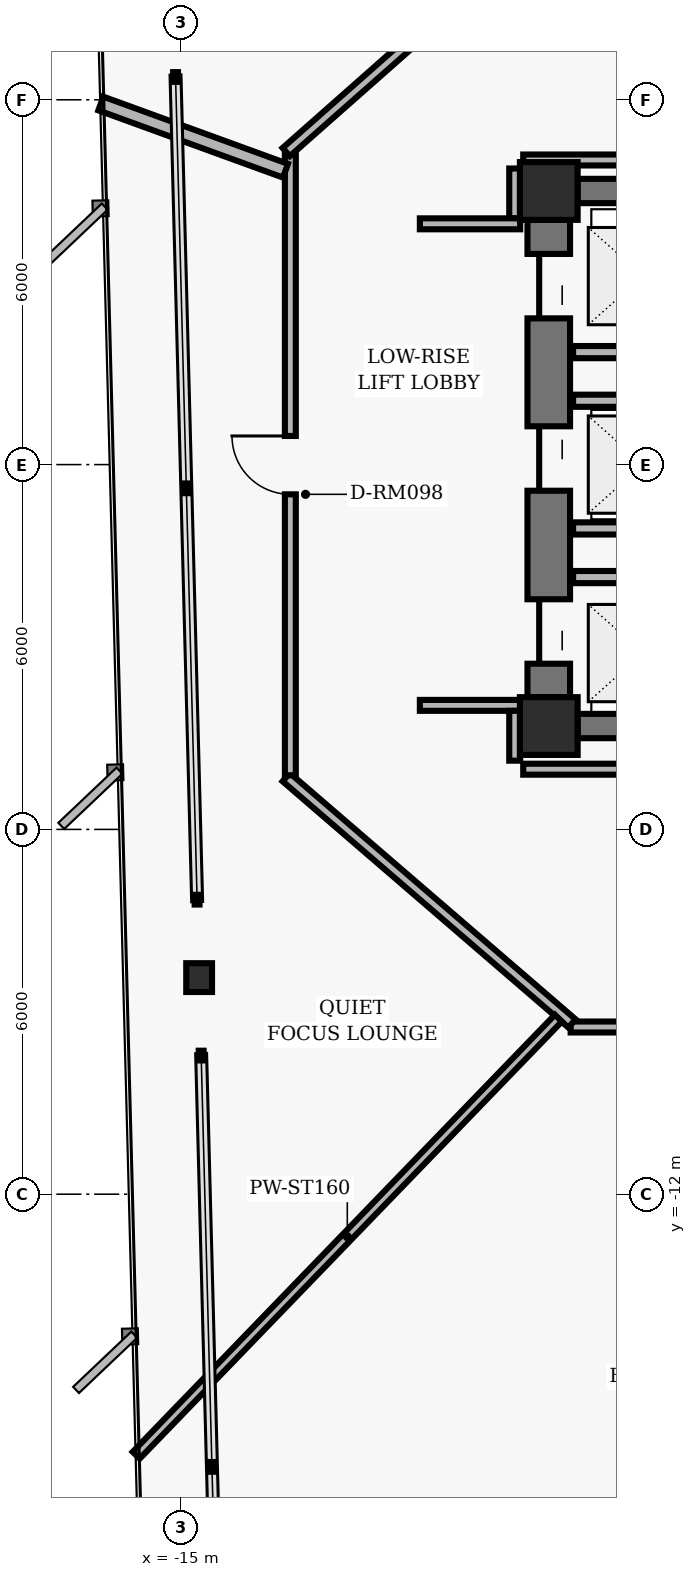
"""IFC4 building model, lengths in metres.
Left out: names, types, materials, properties, quantities, classifications, styles, units other than length and angle.
Written with IfcOpenShell. Run it as: python <this file> out.ifc"""

import sys

from ifc_helpers import new_model, si_unit, direction, frame, frame_2d, origin, origin_2d, place, context, subcontext, project, spatial, rectangle, hollow_rectangle, i_section, extrude, element, fill, save


model = new_model("IFC4")
c1 = context("Model", 3, precision=1e-05, world=origin(), true_north=direction((0.0, 1.0)))
c2 = subcontext(c1, "Body", "Model", "MODEL_VIEW")
j1 = project(units=[si_unit("LENGTHUNIT", "METRE"), si_unit("PLANEANGLEUNIT", "RADIAN")], contexts=[c1])
p1 = place(None, origin())
s1 = spatial("IfcSite", under=j1, at=p1, CompositionType="ELEMENT")
p2 = place(p1, origin())
s2 = spatial("IfcBuilding", under=s1, at=p2, CompositionType="ELEMENT")
p3 = place(p2, frame((0.0, 0.0, 39.04)))
s3 = spatial("IfcBuildingStorey", under=s2, at=p3, CompositionType="ELEMENT", Elevation=39.04)
for number, where, z_axis, x_axis in (
    (1, (-8.95, 4.5, 0.0), (0.0, 0.0, 1.0), (1.0, 0.0, 0.0)),
    (2, (-8.95, -4.3, 0.0), (0.0, 0.0, 1.0), (1.0, 0.0, 0.0)),
):
    element("IfcColumn", number, at=place(p3, frame(where, z_axis=z_axis, x_axis=x_axis)), inside=s3, PredefinedType="COLUMN", context=c2, shape_type="SweptSolid", body=[
        extrude(hollow_rectangle(XDim=0.95, YDim=0.95, WallThickness=0.06, InnerFilletRadius=0.02, OuterFilletRadius=0.04, at=origin_2d()), origin(), (0.0, 0.0, 1.0), 3.36),
    ])
p4 = place(p3, frame((-8.95, -3.825, 0.0), z_axis=(0.0, 0.0, 1.0), x_axis=(0.0, 1.0, 0.0)))
e3 = element("IfcWall", 3, at=p4, inside=s3, PredefinedType="SHEAR", context=c2, shape_type="SweptSolid", body=[
    extrude(rectangle(XDim=7.85, YDim=0.7, at=frame_2d((3.925, 0.0))), origin(), (0.0, 0.0, 1.0), 3.098),
])
p5 = place(p4, frame((0.55, 0.0, 0.0)))
e4 = element("IfcOpeningElement", 4, at=p5, cuts=e3, PredefinedType="OPENING", context=c2, shape_type="SweptSolid", body=[
    extrude(rectangle(XDim=1.06, YDim=2.04, at=frame_2d((0.53, 1.02))), frame((0.0, 0.36, 0.0), z_axis=(0.0, -1.0, 0.0), x_axis=(1.0, 0.0, 0.0)), (0.0, 0.0, 1.0), 0.72),
])
p6 = place(p4, frame((3.395, 0.0, 0.0)))
e5 = element("IfcOpeningElement", 5, at=p6, cuts=e3, PredefinedType="OPENING", context=c2, shape_type="SweptSolid", body=[
    extrude(rectangle(XDim=1.06, YDim=2.04, at=frame_2d((0.53, 1.02))), frame((0.0, 0.36, 0.0), z_axis=(0.0, -1.0, 0.0), x_axis=(1.0, 0.0, 0.0)), (0.0, 0.0, 1.0), 0.72),
])
p7 = place(p4, frame((6.23, 0.0, 0.0)))
e6 = element("IfcOpeningElement", 6, at=p7, cuts=e3, PredefinedType="OPENING", context=c2, shape_type="SweptSolid", body=[
    extrude(rectangle(XDim=1.06, YDim=2.04, at=frame_2d((0.53, 1.02))), frame((0.0, 0.36, 0.0), z_axis=(0.0, -1.0, 0.0), x_axis=(1.0, 0.0, 0.0)), (0.0, 0.0, 1.0), 0.72),
])
for number, where, z_axis, x_axis in (
    (7, (-8.475, 4.5, 0.0), (0.0, 0.0, 1.0), (1.0, 0.0, 0.0)),
    (8, (-8.475, -4.3, 0.0), (0.0, 0.0, 1.0), (1.0, 0.0, 0.0)),
):
    element("IfcWall", number, at=place(p3, frame(where, z_axis=z_axis, x_axis=x_axis)), inside=s3, PredefinedType="SHEAR", context=c2, shape_type="SweptSolid", body=[
        extrude(rectangle(XDim=1.95, YDim=0.4, at=frame_2d((0.975, 0.0))), origin(), (0.0, 0.0, 1.0), 3.098),
    ])
p8 = place(p3, frame((-14.7, -8.438, 0.0), z_axis=(0.0, 0.0, 1.0), x_axis=(1.0, 0.0, 0.0)))
e9 = element("IfcColumn", 9, at=p8, inside=s3, PredefinedType="COLUMN", context=c2, shape_type="SweptSolid", body=[
    extrude(i_section(OverallWidth=0.424, OverallDepth=0.474, WebThickness=0.048, FlangeThickness=0.077, FilletRadius=0.025, at=origin_2d()), origin(), (0.0, 0.0, 1.0), 3.36),
])
for number, where, z_axis, x_axis in (
    (10, (-8.55, -1.85, 0.0), (0.0, 0.0, 1.0), (1.0, 0.0, 0.0)),
    (11, (-8.55, 1.85, 0.0), (0.0, 0.0, 1.0), (1.0, 0.0, 0.0)),
):
    element("IfcWall", number, at=place(p3, frame(where, z_axis=z_axis, x_axis=x_axis)), inside=s3, PredefinedType="PARTITIONING", context=c2, shape_type="SweptSolid", body=[
        extrude(rectangle(XDim=2.1, YDim=0.2, at=frame_2d((1.05, 0.0))), origin(), (0.0, 0.0, 1.0), 3.073),
    ])
for number, where, z_axis, x_axis in (
    (12, (-8.55, -1.05, 0.0), (0.0, 0.0, 1.0), (1.0, 0.0, 0.0)),
    (13, (-8.55, 1.05, 0.0), (0.0, 0.0, 1.0), (1.0, 0.0, 0.0)),
):
    element("IfcWall", number, at=place(p3, frame(where, z_axis=z_axis, x_axis=x_axis)), inside=s3, PredefinedType="PARTITIONING", context=c2, shape_type="SweptSolid", body=[
        extrude(rectangle(XDim=1.91, YDim=0.2, at=frame_2d((0.955, 0.0))), origin(), (0.0, 0.0, 1.0), 3.073),
    ])
p9 = place(p3, frame((8.41, -9.25, 0.0), z_axis=(0.0, 0.0, 1.0), x_axis=(-1.0, 0.0, 0.0)))
e14 = element("IfcWall", 14, at=p9, inside=s3, PredefinedType="PARTITIONING", context=c2, shape_type="SweptSolid", body=[
    extrude(rectangle(XDim=17.0, YDim=0.18, at=frame_2d((8.5, 0.0))), origin(), (0.0, 0.0, 1.0), 2.587),
])
p10 = place(p9, frame((9.399, 0.0, 0.0)))
e15 = element("IfcOpeningElement", 15, at=p10, cuts=e14, PredefinedType="OPENING", context=c2, shape_type="SweptSolid", body=[
    extrude(rectangle(XDim=0.96, YDim=2.02, at=frame_2d((0.48, 1.01))), frame((0.0, 0.1, 0.0), z_axis=(0.0, -1.0, 0.0), x_axis=(1.0, 0.0, 0.0)), (0.0, 0.0, 1.0), 0.2),
])
p11 = place(p3, frame((-8.568, -9.191, 0.0), z_axis=(0.0, 0.0, 1.0), x_axis=(-0.757556899173, 0.652769135694, 0.0)))
e16 = element("IfcWall", 16, at=p11, inside=s3, PredefinedType="PARTITIONING", context=c2, shape_type="SweptSolid", body=[
    extrude(rectangle(XDim=6.204, YDim=0.18, at=frame_2d((3.102, 0.0))), origin(), (0.0, 0.0, 1.0), 3.073),
])
p12 = place(p3, frame((-13.2, -5.11, 0.0), z_axis=(0.0, 0.0, 1.0), x_axis=(0.0, 1.0, 0.0)))
e17 = element("IfcWall", 17, at=p12, inside=s3, PredefinedType="PARTITIONING", context=c2, shape_type="SweptSolid", body=[
    extrude(rectangle(XDim=10.22, YDim=0.18, at=frame_2d((5.11, 0.0))), origin(), (0.0, 0.0, 1.0), 2.587),
])
p13 = place(p12, frame((4.621, 0.0, 0.0)))
e18 = element("IfcOpeningElement", 18, at=p13, cuts=e17, PredefinedType="OPENING", context=c2, shape_type="SweptSolid", body=[
    extrude(rectangle(XDim=0.96, YDim=2.02, at=frame_2d((0.48, 1.01))), frame((0.0, 0.1, 0.0), z_axis=(0.0, -1.0, 0.0), x_axis=(1.0, 0.0, 0.0)), (0.0, 0.0, 1.0), 0.2),
])
p14 = place(p3, frame((-13.268, 5.14, 0.0), z_axis=(0.0, 0.0, 1.0), x_axis=(0.749626463267, 0.66186113768, 0.0)))
e19 = element("IfcWall", 19, at=p14, inside=s3, PredefinedType="PARTITIONING", context=c2, shape_type="SweptSolid", body=[
    extrude(rectangle(XDim=6.27, YDim=0.18, at=frame_2d((3.135, 0.0))), origin(), (0.0, 0.0, 1.0), 3.073),
])
p15 = place(p3, frame((-9.51, 4.87, 0.0), z_axis=(0.0, 0.0, 1.0), x_axis=(0.0, -1.0, 0.0)))
e20 = element("IfcWall", 20, at=p15, inside=s3, PredefinedType="PARTITIONING", context=c2, shape_type="SweptSolid", body=[
    extrude(rectangle(XDim=0.82, YDim=0.18, at=frame_2d((0.41, 0.0))), origin(), (0.0, 0.0, 1.0), 3.073),
])
for number, where, z_axis, x_axis in (
    (21, (-9.42, 3.96, 0.0), (0.0, 0.0, 1.0), (-1.0, 0.0, 0.0)),
    (22, (-11.07, -3.96, 0.0), (0.0, 0.0, 1.0), (1.0, 0.0, 0.0)),
):
    element("IfcWall", number, at=place(p3, frame(where, z_axis=z_axis, x_axis=x_axis)), inside=s3, PredefinedType="PARTITIONING", context=c2, shape_type="SweptSolid", body=[
        extrude(rectangle(XDim=1.65, YDim=0.18, at=frame_2d((0.825, 0.0))), origin(), (0.0, 0.0, 1.0), 3.073),
    ])
p16 = place(p3, frame((-9.51, -4.05, 0.0), z_axis=(0.0, 0.0, 1.0), x_axis=(0.0, -1.0, 0.0)))
e23 = element("IfcWall", 23, at=p16, inside=s3, PredefinedType="PARTITIONING", context=c2, shape_type="SweptSolid", body=[
    extrude(rectangle(XDim=0.82, YDim=0.18, at=frame_2d((0.41, 0.0))), origin(), (0.0, 0.0, 1.0), 2.358),
])
p17 = place(p3, frame((-9.37, -5.01, 0.0), z_axis=(0.0, 0.0, 1.0), x_axis=(1.0, 0.0, 0.0)))
e24 = element("IfcWall", 24, at=p17, inside=s3, PredefinedType="PARTITIONING", context=c2, shape_type="SweptSolid", body=[
    extrude(rectangle(XDim=3.34, YDim=0.18, at=frame_2d((1.67, 0.0))), origin(), (0.0, 0.0, 1.0), 3.073),
])
p18 = place(p3, frame((-6.562, 5.01, 0.0), z_axis=(0.0, 0.0, 1.0), x_axis=(-1.0, 0.0, 0.0)))
e25 = element("IfcWall", 25, at=p18, inside=s3, PredefinedType="PARTITIONING", context=c2, shape_type="SweptSolid", body=[
    extrude(rectangle(XDim=2.808, YDim=0.18, at=frame_2d((1.404, 0.0))), origin(), (0.0, 0.0, 1.0), 3.073),
])
p19 = place(p3, frame((-8.792, -9.104, 0.0), z_axis=(0.0, 0.0, 1.0), x_axis=(-0.694663387969, -0.719334954952, 0.0)))
e26 = element("IfcWall", 26, at=p19, inside=s3, PredefinedType="PARTITIONING", context=c2, shape_type="SweptSolid", body=[
    extrude(rectangle(XDim=9.995, YDim=0.16, at=frame_2d((4.997, 0.0))), origin(), (0.0, 0.0, 1.0), 3.073),
])
p20 = place(p3, frame((-13.28, 4.833, 0.0), z_axis=(0.0, 0.0, 1.0), x_axis=(-0.939702957278, 0.341991742712, 0.0)))
e27 = element("IfcWall", 27, at=p20, inside=s3, PredefinedType="PARTITIONING", context=c2, shape_type="SweptSolid", body=[
    extrude(rectangle(XDim=3.232, YDim=0.24, at=frame_2d((1.616, 0.0))), origin(), (0.0, 0.0, 1.0), 3.073),
])
p21 = place(p5, origin())
e28 = element("IfcDoor", 28, at=p21, inside=s3, OperationType="SLIDING_TO_LEFT", PredefinedType="DOOR", context=c2, shape_type="SweptSolid", body=[
    extrude(rectangle(XDim=1.06, YDim=2.04, at=frame_2d((0.53, 1.02))), frame((0.0, 0.025, 0.0), z_axis=(0.0, -1.0, 0.0), x_axis=(1.0, 0.0, 0.0)), (0.0, 0.0, 1.0), 0.05),
])
fill(e4, e28)
p22 = place(p6, origin())
e29 = element("IfcDoor", 29, at=p22, inside=s3, OperationType="SLIDING_TO_RIGHT", PredefinedType="DOOR", context=c2, shape_type="SweptSolid", body=[
    extrude(rectangle(XDim=1.06, YDim=2.04, at=frame_2d((0.53, 1.02))), frame((0.0, 0.025, 0.0), z_axis=(0.0, -1.0, 0.0), x_axis=(1.0, 0.0, 0.0)), (0.0, 0.0, 1.0), 0.05),
])
fill(e5, e29)
p23 = place(p7, origin())
e30 = element("IfcDoor", 30, at=p23, inside=s3, OperationType="SLIDING_TO_LEFT", PredefinedType="DOOR", context=c2, shape_type="SweptSolid", body=[
    extrude(rectangle(XDim=1.06, YDim=2.04, at=frame_2d((0.53, 1.02))), frame((0.0, 0.025, 0.0), z_axis=(0.0, -1.0, 0.0), x_axis=(1.0, 0.0, 0.0)), (0.0, 0.0, 1.0), 0.05),
])
fill(e6, e30)
p24 = place(p13, origin())
e31 = element("IfcDoor", 31, at=p24, inside=s3, OperationType="SINGLE_SWING_RIGHT", PredefinedType="DOOR", context=c2, shape_type="SweptSolid", body=[
    extrude(rectangle(XDim=0.96, YDim=2.02, at=frame_2d((0.48, 1.01))), frame((0.0, 0.025, 0.0), z_axis=(0.0, -1.0, 0.0), x_axis=(1.0, 0.0, 0.0)), (0.0, 0.0, 1.0), 0.05),
])
fill(e18, e31)
save(model, sys.argv[1])
